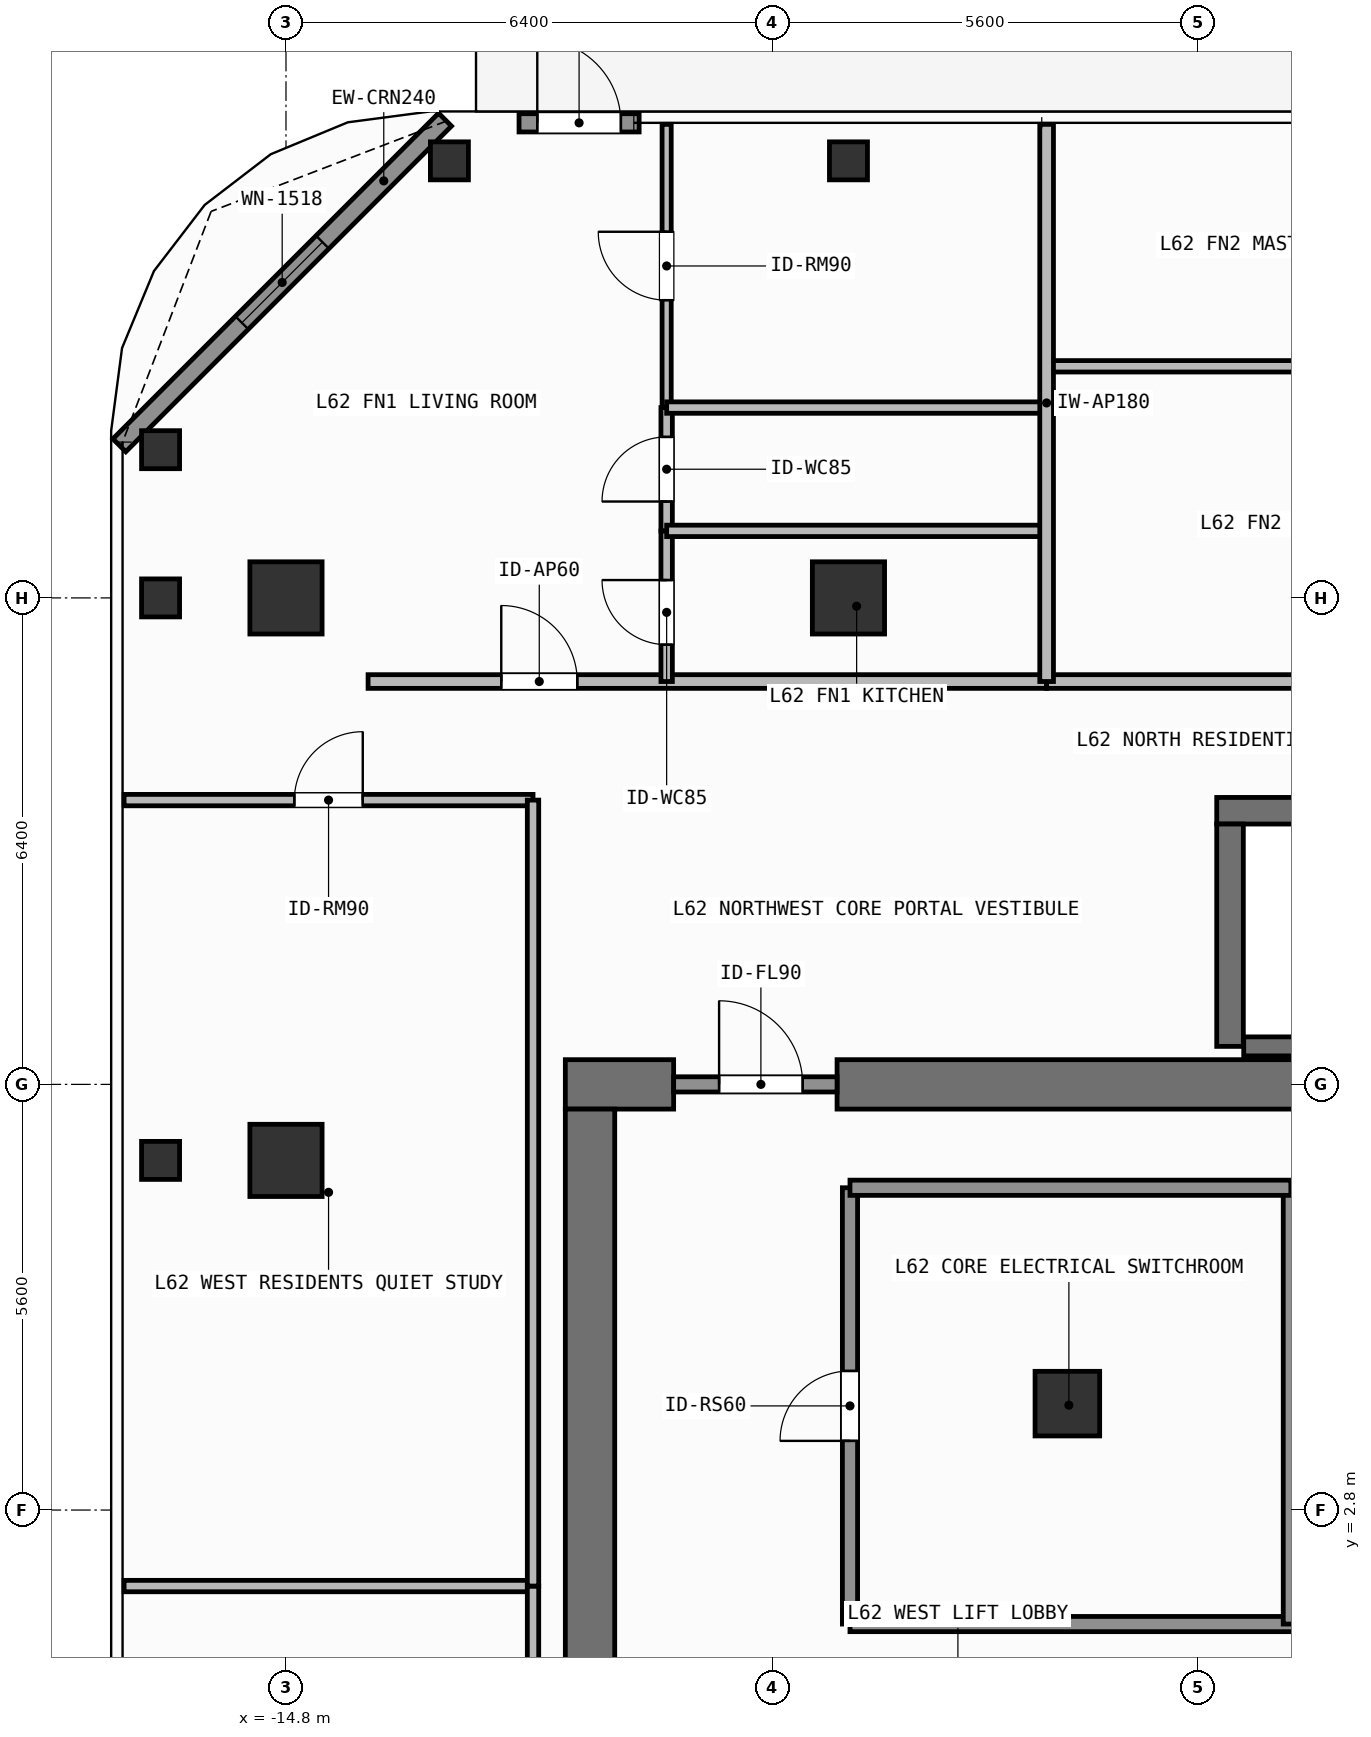
"""IFC4 building model, lengths in metres.
Left out: names, types, materials, properties, quantities, classifications, styles, units other than length and angle.
Written with IfcOpenShell. Run it as: python <this file> out.ifc"""

import sys

from ifc_helpers import new_model, si_unit, direction, frame, frame_2d, origin, origin_2d, place, context, subcontext, project, spatial, rectangle, hollow_rectangle, extrude, element, fill, save


model = new_model("IFC4")
c1 = context("Model", 3, precision=1e-05, world=origin(), true_north=direction((0.0, 1.0)))
c2 = subcontext(c1, "Body", "Model", "MODEL_VIEW")
j1 = project(units=[si_unit("LENGTHUNIT", "METRE"), si_unit("PLANEANGLEUNIT", "RADIAN")], contexts=[c1])
p1 = place(None, origin())
s1 = spatial("IfcSite", under=j1, at=p1, CompositionType="ELEMENT")
p2 = place(p1, origin())
s2 = spatial("IfcBuilding", under=s1, at=p2, CompositionType="ELEMENT")
p3 = place(p2, frame((0.0, 0.0, 254.7)))
s3 = spatial("IfcBuildingStorey", under=s2, at=p3, CompositionType="ELEMENT", Elevation=254.7)
p4 = place(p3, frame((-11.125, 8.4, 0.0), z_axis=(0.0, 0.0, 1.0), x_axis=(1.0, 0.0, 0.0)))
e1 = element("IfcWall", 1, at=p4, inside=s3, PredefinedType="SHEAR", context=c2, shape_type="SweptSolid", body=[
    extrude(rectangle(XDim=1.425, YDim=0.65, at=frame_2d((0.712, 0.0))), origin(), (0.0, 0.0, 1.0), 3.9),
])
p5 = place(p3, frame((-7.55, 8.4, 0.0), z_axis=(0.0, 0.0, 1.0), x_axis=(1.0, 0.0, 0.0)))
e2 = element("IfcWall", 2, at=p5, inside=s3, PredefinedType="SHEAR", context=c2, shape_type="SweptSolid", body=[
    extrude(rectangle(XDim=16.275, YDim=0.65, at=frame_2d((8.138, 0.0))), origin(), (0.0, 0.0, 1.0), 3.9),
])
p6 = place(p3, frame((-10.8, -8.075, 0.0), z_axis=(0.0, 0.0, 1.0), x_axis=(0.0, 1.0, 0.0)))
e3 = element("IfcWall", 3, at=p6, inside=s3, PredefinedType="SHEAR", context=c2, shape_type="SweptSolid", body=[
    extrude(rectangle(XDim=16.15, YDim=0.65, at=frame_2d((8.075, 0.0))), origin(), (0.0, 0.0, 1.0), 3.9),
])
p7 = place(p3, frame((-2.555, 12.0, 0.0), z_axis=(0.0, 0.0, 1.0), x_axis=(1.0, 0.0, 0.0)))
e4 = element("IfcWall", 4, at=p7, inside=s3, PredefinedType="SHEAR", context=c2, shape_type="SweptSolid", body=[
    extrude(rectangle(XDim=7.31, YDim=0.35, at=frame_2d((3.655, 0.0))), origin(), (0.0, 0.0, 1.0), 3.9),
])
p8 = place(p3, frame((-2.2, 8.9, 0.0), z_axis=(0.0, 0.0, 1.0), x_axis=(1.0, 0.0, 0.0)))
e5 = element("IfcWall", 5, at=p8, inside=s3, PredefinedType="SHEAR", context=c2, shape_type="SweptSolid", body=[
    extrude(rectangle(XDim=6.6, YDim=0.25, at=frame_2d((3.3, 0.0))), origin(), (0.0, 0.0, 1.0), 3.9),
])
p9 = place(p3, frame((-2.38, 8.9, 0.0), z_axis=(0.0, 0.0, 1.0), x_axis=(0.0, 1.0, 0.0)))
e6 = element("IfcWall", 6, at=p9, inside=s3, PredefinedType="SHEAR", context=c2, shape_type="SweptSolid", body=[
    extrude(rectangle(XDim=2.925, YDim=0.35, at=frame_2d((1.462, 0.0))), origin(), (0.0, 0.0, 1.0), 3.9),
])
for number, where, z_axis, x_axis in (
    (7, (-14.8, 14.8, 0.0), (0.0, 0.0, 1.0), (1.0, 0.0, 0.0)),
    (8, (-7.4, 14.8, 0.0), (0.0, 0.0, 1.0), (1.0, 0.0, 0.0)),
    (9, (-14.8, 7.4, 0.0), (0.0, 0.0, 1.0), (1.0, 0.0, 0.0)),
):
    element("IfcColumn", number, at=place(p3, frame(where, z_axis=z_axis, x_axis=x_axis)), inside=s3, PredefinedType="COLUMN", context=c2, shape_type="SweptSolid", body=[
        extrude(rectangle(XDim=0.95, YDim=0.95, at=origin_2d()), origin(), (0.0, 0.0, 1.0), 3.9),
    ])
p10 = place(p3, frame((-4.52, 4.2, 0.0), z_axis=(0.0, 0.0, 1.0), x_axis=(1.0, 0.0, 0.0)))
e10 = element("IfcColumn", 10, at=p10, inside=s3, PredefinedType="COLUMN", context=c2, shape_type="SweptSolid", body=[
    extrude(rectangle(XDim=0.85, YDim=0.85, at=origin_2d()), origin(), (0.0, 0.0, 1.0), 3.9),
])
for number, where, z_axis, x_axis in (
    (11, (-12.65, 20.55, 0.0), (0.0, 0.0, 1.0), (1.0, 0.0, 0.0)),
    (12, (-16.45, 16.75, 0.0), (0.0, 0.0, 1.0), (1.0, 0.0, 0.0)),
    (13, (-7.4, 20.55, 0.0), (0.0, 0.0, 1.0), (1.0, 0.0, 0.0)),
    (14, (-16.45, 7.4, 0.0), (0.0, 0.0, 1.0), (1.0, 0.0, 0.0)),
    (15, (-16.45, 14.8, 0.0), (0.0, 0.0, 1.0), (1.0, 0.0, 0.0)),
):
    element("IfcColumn", number, at=place(p3, frame(where, z_axis=z_axis, x_axis=x_axis)), inside=s3, PredefinedType="COLUMN", context=c2, shape_type="SweptSolid", body=[
        extrude(hollow_rectangle(XDim=0.5, YDim=0.5, WallThickness=0.025, at=origin_2d()), origin(), (0.0, 0.0, 1.0), 3.9),
    ])
p11 = place(p3, frame((-11.734, 21.05, 0.0), z_axis=(0.0, 0.0, 1.0), x_axis=(1.0, 0.0, 0.0)))
e16 = element("IfcWall", 16, at=p11, inside=s3, PredefinedType="SOLIDWALL", context=c2, shape_type="SweptSolid", body=[
    extrude(rectangle(XDim=1.58, YDim=0.24, at=frame_2d((0.79, 0.0))), origin(), (0.0, 0.0, 1.0), 3.68),
])
p12 = place(p11, frame((0.24, 0.0, 0.0)))
e17 = element("IfcOpeningElement", 17, at=p12, cuts=e16, PredefinedType="OPENING", context=c2, shape_type="SweptSolid", body=[
    extrude(rectangle(XDim=1.1, YDim=2.2, at=frame_2d((0.55, 1.1))), frame((0.0, 0.13, 0.0), z_axis=(0.0, -1.0, 0.0), x_axis=(1.0, 0.0, 0.0)), (0.0, 0.0, 1.0), 0.26),
])
p13 = place(p3, frame((-16.992, 16.808, 0.0), z_axis=(0.0, 0.0, 1.0), x_axis=(0.707126925818, 0.707086635981, 0.0)))
e18 = element("IfcWall", 18, at=p13, inside=s3, PredefinedType="SOLIDWALL", context=c2, shape_type="SweptSolid", body=[
    extrude(rectangle(XDim=6.06, YDim=0.24, at=frame_2d((3.03, 0.0))), origin(), (0.0, 0.0, 1.0), 3.68),
])
p14 = place(p13, frame((2.28, 0.0, 0.8)))
e19 = element("IfcOpeningElement", 19, at=p14, cuts=e18, PredefinedType="OPENING", context=c2, shape_type="SweptSolid", body=[
    extrude(rectangle(XDim=1.5, YDim=1.85, at=frame_2d((0.75, 0.925))), frame((0.0, 0.13, 0.0), z_axis=(0.0, -1.0, 0.0), x_axis=(1.0, 0.0, 0.0)), (0.0, 0.0, 1.0), 0.26),
])
p15 = place(p3, frame((-9.7, 8.4, 0.0), z_axis=(0.0, 0.0, 1.0), x_axis=(1.0, 0.0, 0.0)))
e20 = element("IfcWall", 20, at=p15, inside=s3, PredefinedType="SOLIDWALL", context=c2, shape_type="SweptSolid", body=[
    extrude(rectangle(XDim=2.15, YDim=0.2, at=frame_2d((1.075, 0.0))), origin(), (0.0, 0.0, 1.0), 2.92),
])
p16 = place(p15, frame((0.598, 0.0, 0.0)))
e21 = element("IfcOpeningElement", 21, at=p16, cuts=e20, PredefinedType="OPENING", context=c2, shape_type="SweptSolid", body=[
    extrude(rectangle(XDim=1.1, YDim=2.15, at=frame_2d((0.55, 1.075))), frame((0.0, 0.11, 0.0), z_axis=(0.0, -1.0, 0.0), x_axis=(1.0, 0.0, 0.0)), (0.0, 0.0, 1.0), 0.22),
])
p17 = place(p3, frame((-7.38, 1.3, 0.0), z_axis=(0.0, 0.0, 1.0), x_axis=(0.0, 1.0, 0.0)))
e22 = element("IfcWall", 22, at=p17, inside=s3, PredefinedType="SOLIDWALL", context=c2, shape_type="SweptSolid", body=[
    extrude(rectangle(XDim=5.74, YDim=0.2, at=frame_2d((2.87, 0.0))), origin(), (0.0, 0.0, 1.0), 3.68),
])
p18 = place(p17, frame((2.41, 0.0, 0.0)))
e23 = element("IfcOpeningElement", 23, at=p18, cuts=e22, PredefinedType="OPENING", context=c2, shape_type="SweptSolid", body=[
    extrude(rectangle(XDim=0.92, YDim=2.1, at=frame_2d((0.46, 1.05))), frame((0.0, 0.11, 0.0), z_axis=(0.0, -1.0, 0.0), x_axis=(1.0, 0.0, 0.0)), (0.0, 0.0, 1.0), 0.22),
])
p19 = place(p3, frame((-13.72, 13.7, 0.0), z_axis=(0.0, 0.0, 1.0), x_axis=(1.0, 0.0, 0.0)))
e24 = element("IfcWall", 24, at=p19, inside=s3, PredefinedType="PARTITIONING", context=c2, shape_type="SweptSolid", body=[
    extrude(rectangle(XDim=8.927, YDim=0.18, at=frame_2d((4.463, 0.0))), origin(), (0.0, 0.0, 1.0), 3.68),
])
p20 = place(p19, frame((1.752, 0.0, 0.0)))
e25 = element("IfcOpeningElement", 25, at=p20, cuts=e24, PredefinedType="OPENING", context=c2, shape_type="SweptSolid", body=[
    extrude(rectangle(XDim=1.0, YDim=2.2, at=frame_2d((0.5, 1.1))), frame((0.0, 0.1, 0.0), z_axis=(0.0, -1.0, 0.0), x_axis=(1.0, 0.0, 0.0)), (0.0, 0.0, 1.0), 0.2),
])
p21 = place(p3, frame((-9.792, 13.7, 0.0), z_axis=(0.0, 0.0, 1.0), x_axis=(0.0, 1.0, 0.0)))
e26 = element("IfcWall", 26, at=p21, inside=s3, PredefinedType="PARTITIONING", context=c2, shape_type="SweptSolid", body=[
    extrude(rectangle(XDim=1.982, YDim=0.15, at=frame_2d((0.991, 0.0))), origin(), (0.0, 0.0, 1.0), 3.68),
])
p22 = place(p21, frame((0.485, 0.0, 0.0)))
e27 = element("IfcOpeningElement", 27, at=p22, cuts=e26, PredefinedType="OPENING", context=c2, shape_type="SweptSolid", body=[
    extrude(rectangle(XDim=0.85, YDim=2.1, at=frame_2d((0.425, 1.05))), frame((0.0, 0.085, 0.0), z_axis=(0.0, -1.0, 0.0), x_axis=(1.0, 0.0, 0.0)), (0.0, 0.0, 1.0), 0.17),
])
p23 = place(p3, frame((-9.792, 15.682, 0.0), z_axis=(0.0, 0.0, 1.0), x_axis=(0.0, 1.0, 0.0)))
e28 = element("IfcWall", 28, at=p23, inside=s3, PredefinedType="PARTITIONING", context=c2, shape_type="SweptSolid", body=[
    extrude(rectangle(XDim=1.622, YDim=0.15, at=frame_2d((0.811, 0.0))), origin(), (0.0, 0.0, 1.0), 3.68),
])
p24 = place(p23, frame((0.386, 0.0, 0.0)))
e29 = element("IfcOpeningElement", 29, at=p24, cuts=e28, PredefinedType="OPENING", context=c2, shape_type="SweptSolid", body=[
    extrude(rectangle(XDim=0.85, YDim=2.1, at=frame_2d((0.425, 1.05))), frame((0.0, 0.085, 0.0), z_axis=(0.0, -1.0, 0.0), x_axis=(1.0, 0.0, 0.0)), (0.0, 0.0, 1.0), 0.17),
])
p25 = place(p3, frame((-9.792, 17.304, 0.0), z_axis=(0.0, 0.0, 1.0), x_axis=(0.0, 1.0, 0.0)))
e30 = element("IfcWall", 30, at=p25, inside=s3, PredefinedType="PARTITIONING", context=c2, shape_type="SweptSolid", body=[
    extrude(rectangle(XDim=3.726, YDim=0.12, at=frame_2d((1.863, 0.0))), origin(), (0.0, 0.0, 1.0), 3.68),
])
p26 = place(p25, frame((1.413, 0.0, 0.0)))
e31 = element("IfcOpeningElement", 31, at=p26, cuts=e30, PredefinedType="OPENING", context=c2, shape_type="SweptSolid", body=[
    extrude(rectangle(XDim=0.9, YDim=2.1, at=frame_2d((0.45, 1.05))), frame((0.0, 0.07, 0.0), z_axis=(0.0, -1.0, 0.0), x_axis=(1.0, 0.0, 0.0)), (0.0, 0.0, 1.0), 0.14),
])
p27 = place(p3, frame((-4.793, 13.7, 0.0), z_axis=(0.0, 0.0, 1.0), x_axis=(1.0, 0.0, 0.0)))
e32 = element("IfcWall", 32, at=p27, inside=s3, PredefinedType="PARTITIONING", context=c2, shape_type="SweptSolid", body=[
    extrude(rectangle(XDim=15.835, YDim=0.18, at=frame_2d((7.917, 0.0))), origin(), (0.0, 0.0, 1.0), 3.68),
])
p28 = place(p27, frame((7.686, 0.0, 0.0)))
e33 = element("IfcOpeningElement", 33, at=p28, cuts=e32, PredefinedType="OPENING", context=c2, shape_type="SweptSolid", body=[
    extrude(rectangle(XDim=1.0, YDim=2.2, at=frame_2d((0.5, 1.1))), frame((0.0, 0.1, 0.0), z_axis=(0.0, -1.0, 0.0), x_axis=(1.0, 0.0, 0.0)), (0.0, 0.0, 1.0), 0.2),
])
p29 = place(p3, frame((-16.93, 12.14, 0.0), z_axis=(0.0, 0.0, 1.0), x_axis=(1.0, 0.0, 0.0)))
e34 = element("IfcWall", 34, at=p29, inside=s3, PredefinedType="PARTITIONING", context=c2, shape_type="SweptSolid", body=[
    extrude(rectangle(XDim=5.38, YDim=0.15, at=frame_2d((2.69, 0.0))), origin(), (0.0, 0.0, 1.0), 3.68),
])
p30 = place(p29, frame((2.24, 0.0, 0.0)))
e35 = element("IfcOpeningElement", 35, at=p30, cuts=e34, PredefinedType="OPENING", context=c2, shape_type="SweptSolid", body=[
    extrude(rectangle(XDim=0.9, YDim=2.1, at=frame_2d((0.45, 1.05))), frame((0.0, 0.085, 0.0), z_axis=(0.0, -1.0, 0.0), x_axis=(1.0, 0.0, 0.0)), (0.0, 0.0, 1.0), 0.17),
])
p31 = place(p3, frame((-7.38, 1.3, 0.0), z_axis=(0.0, 0.0, 1.0), x_axis=(1.0, 0.0, 0.0)))
e36 = element("IfcWall", 36, at=p31, inside=s3, PredefinedType="SOLIDWALL", context=c2, shape_type="SweptSolid", body=[
    extrude(rectangle(XDim=6.24, YDim=0.2, at=frame_2d((3.12, 0.0))), origin(), (0.0, 0.0, 1.0), 3.68),
])
p32 = place(p3, frame((-1.58, 1.3, 0.0), z_axis=(0.0, 0.0, 1.0), x_axis=(0.0, 1.0, 0.0)))
e37 = element("IfcWall", 37, at=p32, inside=s3, PredefinedType="SOLIDWALL", context=c2, shape_type="SweptSolid", body=[
    extrude(rectangle(XDim=5.74, YDim=0.2, at=frame_2d((2.87, 0.0))), origin(), (0.0, 0.0, 1.0), 3.68),
])
p33 = place(p3, frame((-7.38, 7.04, 0.0), z_axis=(0.0, 0.0, 1.0), x_axis=(1.0, 0.0, 0.0)))
e38 = element("IfcWall", 38, at=p33, inside=s3, PredefinedType="SOLIDWALL", context=c2, shape_type="SweptSolid", body=[
    extrude(rectangle(XDim=5.8, YDim=0.2, at=frame_2d((2.9, 0.0))), origin(), (0.0, 0.0, 1.0), 3.68),
])
for number, where, z_axis, x_axis in (
    (39, (-9.792, 15.682, 0.0), (0.0, 0.0, 1.0), (1.0, 0.0, 0.0)),
    (40, (-9.792, 17.304, 0.0), (0.0, 0.0, 1.0), (1.0, 0.0, 0.0)),
):
    element("IfcWall", number, at=place(p3, frame(where, z_axis=z_axis, x_axis=x_axis)), inside=s3, PredefinedType="PARTITIONING", context=c2, shape_type="SweptSolid", body=[
        extrude(rectangle(XDim=4.999, YDim=0.15, at=frame_2d((2.5, 0.0))), origin(), (0.0, 0.0, 1.0), 3.68),
    ])
p34 = place(p3, frame((-4.793, 17.847, 0.0), z_axis=(0.0, 0.0, 1.0), x_axis=(1.0, 0.0, 0.0)))
e41 = element("IfcWall", 41, at=p34, inside=s3, PredefinedType="PARTITIONING", context=c2, shape_type="SweptSolid", body=[
    extrude(rectangle(XDim=6.334, YDim=0.15, at=frame_2d((3.167, 0.0))), origin(), (0.0, 0.0, 1.0), 3.68),
])
p35 = place(p3, frame((-4.793, 13.7, 0.0), z_axis=(0.0, 0.0, 1.0), x_axis=(0.0, 1.0, 0.0)))
e42 = element("IfcWall", 42, at=p35, inside=s3, PredefinedType="PARTITIONING", context=c2, shape_type="SweptSolid", body=[
    extrude(rectangle(XDim=7.33, YDim=0.18, at=frame_2d((3.665, 0.0))), origin(), (0.0, 0.0, 1.0), 3.68),
])
p36 = place(p3, frame((-16.93, 1.8, 0.0), z_axis=(0.0, 0.0, 1.0), x_axis=(1.0, 0.0, 0.0)))
e43 = element("IfcWall", 43, at=p36, inside=s3, PredefinedType="PARTITIONING", context=c2, shape_type="SweptSolid", body=[
    extrude(rectangle(XDim=5.38, YDim=0.15, at=frame_2d((2.69, 0.0))), origin(), (0.0, 0.0, 1.0), 3.68),
])
p37 = place(p3, frame((-11.55, -12.14, 0.0), z_axis=(0.0, 0.0, 1.0), x_axis=(0.0, 1.0, 0.0)))
e44 = element("IfcWall", 44, at=p37, inside=s3, PredefinedType="PARTITIONING", context=c2, shape_type="SweptSolid", body=[
    extrude(rectangle(XDim=13.94, YDim=0.15, at=frame_2d((6.97, 0.0))), origin(), (0.0, 0.0, 1.0), 3.68),
])
p38 = place(p3, frame((-11.55, 1.8, 0.0), z_axis=(0.0, 0.0, 1.0), x_axis=(0.0, 1.0, 0.0)))
e45 = element("IfcWall", 45, at=p38, inside=s3, PredefinedType="PARTITIONING", context=c2, shape_type="SweptSolid", body=[
    extrude(rectangle(XDim=10.34, YDim=0.15, at=frame_2d((5.17, 0.0))), origin(), (0.0, 0.0, 1.0), 3.68),
])
p39 = place(p12, origin())
e46 = element("IfcDoor", 46, at=p39, inside=s3, OperationType="SINGLE_SWING_LEFT", PredefinedType="DOOR", context=c2, shape_type="SweptSolid", body=[
    extrude(rectangle(XDim=1.1, YDim=2.2, at=frame_2d((0.55, 1.1))), frame((0.0, 0.025, 0.0), z_axis=(0.0, -1.0, 0.0), x_axis=(1.0, 0.0, 0.0)), (0.0, 0.0, 1.0), 0.05),
])
fill(e17, e46)
p40 = place(p14, origin())
e47 = element("IfcWindow", 47, at=p40, inside=s3, PartitioningType="SINGLE_PANEL", PredefinedType="WINDOW", context=c2, shape_type="SweptSolid", body=[
    extrude(rectangle(XDim=1.5, YDim=1.85, at=frame_2d((0.75, 0.925))), frame((0.0, 0.03, 0.0), z_axis=(0.0, -1.0, 0.0), x_axis=(1.0, 0.0, 0.0)), (0.0, 0.0, 1.0), 0.06),
])
fill(e19, e47)
p41 = place(p16, origin())
e48 = element("IfcDoor", 48, at=p41, inside=s3, OperationType="SINGLE_SWING_LEFT", PredefinedType="DOOR", context=c2, shape_type="SweptSolid", body=[
    extrude(rectangle(XDim=1.1, YDim=2.15, at=frame_2d((0.55, 1.075))), frame((0.0, 0.025, 0.0), z_axis=(0.0, -1.0, 0.0), x_axis=(1.0, 0.0, 0.0)), (0.0, 0.0, 1.0), 0.05),
])
fill(e21, e48)
p42 = place(p18, origin())
e49 = element("IfcDoor", 49, at=p42, inside=s3, OperationType="SINGLE_SWING_LEFT", PredefinedType="DOOR", context=c2, shape_type="SweptSolid", body=[
    extrude(rectangle(XDim=0.92, YDim=2.1, at=frame_2d((0.46, 1.05))), frame((0.0, 0.025, 0.0), z_axis=(0.0, -1.0, 0.0), x_axis=(1.0, 0.0, 0.0)), (0.0, 0.0, 1.0), 0.05),
])
fill(e23, e49)
p43 = place(p20, origin())
e50 = element("IfcDoor", 50, at=p43, inside=s3, OperationType="SINGLE_SWING_LEFT", PredefinedType="DOOR", context=c2, shape_type="SweptSolid", body=[
    extrude(rectangle(XDim=1.0, YDim=2.2, at=frame_2d((0.5, 1.1))), frame((0.0, 0.025, 0.0), z_axis=(0.0, -1.0, 0.0), x_axis=(1.0, 0.0, 0.0)), (0.0, 0.0, 1.0), 0.05),
])
fill(e25, e50)
p44 = place(p22, origin())
e51 = element("IfcDoor", 51, at=p44, inside=s3, OperationType="SINGLE_SWING_RIGHT", PredefinedType="DOOR", context=c2, shape_type="SweptSolid", body=[
    extrude(rectangle(XDim=0.85, YDim=2.1, at=frame_2d((0.425, 1.05))), frame((0.0, 0.025, 0.0), z_axis=(0.0, -1.0, 0.0), x_axis=(1.0, 0.0, 0.0)), (0.0, 0.0, 1.0), 0.05),
])
fill(e27, e51)
p45 = place(p24, origin())
e52 = element("IfcDoor", 52, at=p45, inside=s3, OperationType="SINGLE_SWING_LEFT", PredefinedType="DOOR", context=c2, shape_type="SweptSolid", body=[
    extrude(rectangle(XDim=0.85, YDim=2.1, at=frame_2d((0.425, 1.05))), frame((0.0, 0.025, 0.0), z_axis=(0.0, -1.0, 0.0), x_axis=(1.0, 0.0, 0.0)), (0.0, 0.0, 1.0), 0.05),
])
fill(e29, e52)
p46 = place(p26, origin())
e53 = element("IfcDoor", 53, at=p46, inside=s3, OperationType="SINGLE_SWING_RIGHT", PredefinedType="DOOR", context=c2, shape_type="SweptSolid", body=[
    extrude(rectangle(XDim=0.9, YDim=2.1, at=frame_2d((0.45, 1.05))), frame((0.0, 0.025, 0.0), z_axis=(0.0, -1.0, 0.0), x_axis=(1.0, 0.0, 0.0)), (0.0, 0.0, 1.0), 0.05),
])
fill(e31, e53)
p47 = place(p30, origin())
e54 = element("IfcDoor", 54, at=p47, inside=s3, OperationType="SINGLE_SWING_RIGHT", PredefinedType="DOOR", context=c2, shape_type="SweptSolid", body=[
    extrude(rectangle(XDim=0.9, YDim=2.1, at=frame_2d((0.45, 1.05))), frame((0.0, 0.025, 0.0), z_axis=(0.0, -1.0, 0.0), x_axis=(1.0, 0.0, 0.0)), (0.0, 0.0, 1.0), 0.05),
])
fill(e35, e54)
save(model, sys.argv[1])
